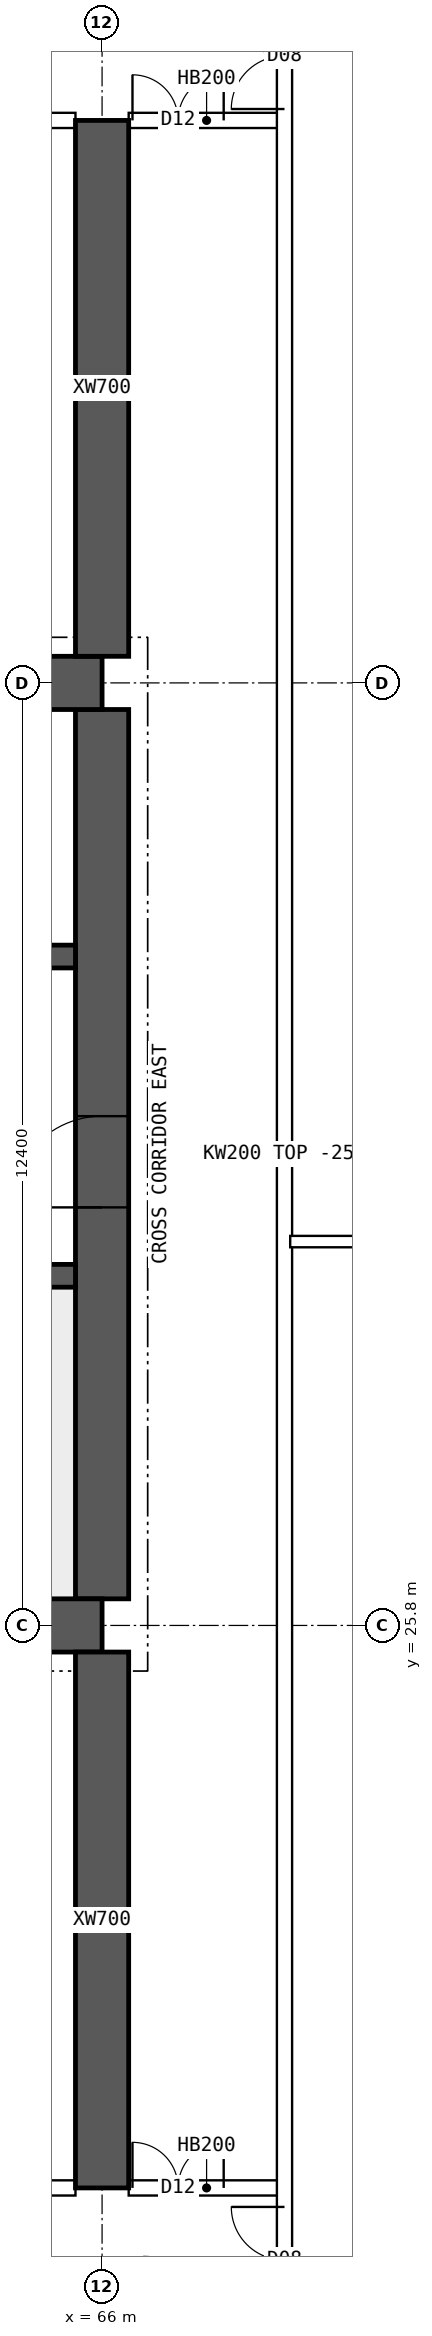
"""IFC4 building model, lengths in metres.
Left out: names, types, materials, properties, quantities, classifications, styles, units other than length and angle.
Written with IfcOpenShell. Run it as: python <this file> out.ifc"""

import sys

from ifc_helpers import new_model, si_unit, direction, frame, frame_2d, origin, place, context, subcontext, project, spatial, polyline, rectangle, outline, extrude, element, fill, save


model = new_model("IFC4")
c1 = context("Model", 3, precision=1e-05, world=origin(), true_north=direction((0.0, 1.0)))
c2 = subcontext(c1, "Body", "Model", "MODEL_VIEW")
j1 = project(units=[si_unit("LENGTHUNIT", "METRE"), si_unit("PLANEANGLEUNIT", "RADIAN")], contexts=[c1])
p1 = place(None, origin())
s1 = spatial("IfcSite", under=j1, at=p1, CompositionType="ELEMENT")
p2 = place(p1, origin())
s2 = spatial("IfcBuilding", under=s1, at=p2, CompositionType="ELEMENT")
p3 = place(p2, frame((0.0, 0.0, 250.3)))
s3 = spatial("IfcBuildingStorey", under=s2, at=p3, CompositionType="ELEMENT", Elevation=250.3)
for number, where, z_axis, x_axis in (
    (1, (18.0, 25.8, 0.0), (0.0, 0.0, 1.0), (1.0, 0.0, 0.0)),
    (2, (18.0, 38.2, 0.0), (0.0, 0.0, 1.0), (1.0, 0.0, 0.0)),
):
    element("IfcWall", number, at=place(p3, frame(where, z_axis=z_axis, x_axis=x_axis)), inside=s3, PredefinedType="SHEAR", context=c2, shape_type="SweptSolid", body=[
        extrude(rectangle(XDim=48.0, YDim=0.7, at=frame_2d((24.0, 0.0))), origin(), (0.0, 0.0, 1.0), 3.75),
    ])
p4 = place(p3, frame((66.0, 26.15, 0.0), z_axis=(0.0, 0.0, 1.0), x_axis=(0.0, 1.0, 0.0)))
e3 = element("IfcWall", 3, at=p4, inside=s3, PredefinedType="SHEAR", context=c2, shape_type="SweptSolid", body=[
    extrude(rectangle(XDim=11.7, YDim=0.7, at=frame_2d((5.85, 0.0))), origin(), (0.0, 0.0, 1.0), 3.75),
])
p5 = place(p4, frame((5.15, 0.0, 0.0)))
e4 = element("IfcOpeningElement", 4, at=p5, cuts=e3, PredefinedType="OPENING", context=c2, shape_type="SweptSolid", body=[
    extrude(rectangle(XDim=1.2, YDim=2.1, at=frame_2d((0.6, 1.05))), frame((0.0, 0.36, 0.0), z_axis=(0.0, -1.0, 0.0), x_axis=(1.0, 0.0, 0.0)), (0.0, 0.0, 1.0), 0.72),
])
p6 = place(p3, frame((18.35, 30.4, 0.0), z_axis=(0.0, 0.0, 1.0), x_axis=(1.0, 0.0, 0.0)))
e5 = element("IfcWall", 5, at=p6, inside=s3, PredefinedType="SHEAR", context=c2, shape_type="SweptSolid", body=[
    extrude(rectangle(XDim=47.3, YDim=0.3, at=frame_2d((23.65, 0.0))), origin(), (0.0, 0.0, 1.0), 3.75),
])
p7 = place(p6, frame((0.4, 0.0, 0.0)))
e6 = element("IfcOpeningElement", 6, at=p7, cuts=e5, PredefinedType="OPENING", context=c2, shape_type="SweptSolid", body=[
    extrude(rectangle(XDim=1.0, YDim=2.1, at=frame_2d((0.5, 1.05))), frame((0.0, 0.16, 0.0), z_axis=(0.0, -1.0, 0.0), x_axis=(1.0, 0.0, 0.0)), (0.0, 0.0, 1.0), 0.32),
])
p8 = place(p6, frame((45.9, 0.0, 0.0)))
e7 = element("IfcOpeningElement", 7, at=p8, cuts=e5, PredefinedType="OPENING", context=c2, shape_type="SweptSolid", body=[
    extrude(rectangle(XDim=1.0, YDim=2.1, at=frame_2d((0.5, 1.05))), frame((0.0, 0.16, 0.0), z_axis=(0.0, -1.0, 0.0), x_axis=(1.0, 0.0, 0.0)), (0.0, 0.0, 1.0), 0.32),
])
p9 = place(p6, frame((8.4, 0.0, 0.0)))
e8 = element("IfcOpeningElement", 8, at=p9, cuts=e5, PredefinedType="OPENING", context=c2, shape_type="SweptSolid", body=[
    extrude(rectangle(XDim=1.1, YDim=2.1, at=frame_2d((0.55, 1.05))), frame((0.0, 0.16, 0.0), z_axis=(0.0, -1.0, 0.0), x_axis=(1.0, 0.0, 0.0)), (0.0, 0.0, 1.0), 0.32),
])
p10 = place(p6, frame((11.0, 0.0, 0.0)))
e9 = element("IfcOpeningElement", 9, at=p10, cuts=e5, PredefinedType="OPENING", context=c2, shape_type="SweptSolid", body=[
    extrude(rectangle(XDim=1.1, YDim=2.1, at=frame_2d((0.55, 1.05))), frame((0.0, 0.16, 0.0), z_axis=(0.0, -1.0, 0.0), x_axis=(1.0, 0.0, 0.0)), (0.0, 0.0, 1.0), 0.32),
])
p11 = place(p6, frame((13.6, 0.0, 0.0)))
e10 = element("IfcOpeningElement", 10, at=p11, cuts=e5, PredefinedType="OPENING", context=c2, shape_type="SweptSolid", body=[
    extrude(rectangle(XDim=1.1, YDim=2.1, at=frame_2d((0.55, 1.05))), frame((0.0, 0.16, 0.0), z_axis=(0.0, -1.0, 0.0), x_axis=(1.0, 0.0, 0.0)), (0.0, 0.0, 1.0), 0.32),
])
p12 = place(p6, frame((16.2, 0.0, 0.0)))
e11 = element("IfcOpeningElement", 11, at=p12, cuts=e5, PredefinedType="OPENING", context=c2, shape_type="SweptSolid", body=[
    extrude(rectangle(XDim=1.1, YDim=2.1, at=frame_2d((0.55, 1.05))), frame((0.0, 0.16, 0.0), z_axis=(0.0, -1.0, 0.0), x_axis=(1.0, 0.0, 0.0)), (0.0, 0.0, 1.0), 0.32),
])
p13 = place(p6, frame((18.975, 0.0, 0.0)))
e12 = element("IfcOpeningElement", 12, at=p13, cuts=e5, PredefinedType="OPENING", context=c2, shape_type="SweptSolid", body=[
    extrude(rectangle(XDim=0.9, YDim=2.1, at=frame_2d((0.45, 1.05))), frame((0.0, 0.16, 0.0), z_axis=(0.0, -1.0, 0.0), x_axis=(1.0, 0.0, 0.0)), (0.0, 0.0, 1.0), 0.32),
])
p14 = place(p6, frame((24.475, 0.0, 0.0)))
e13 = element("IfcOpeningElement", 13, at=p14, cuts=e5, PredefinedType="OPENING", context=c2, shape_type="SweptSolid", body=[
    extrude(rectangle(XDim=0.9, YDim=2.1, at=frame_2d((0.45, 1.05))), frame((0.0, 0.16, 0.0), z_axis=(0.0, -1.0, 0.0), x_axis=(1.0, 0.0, 0.0)), (0.0, 0.0, 1.0), 0.32),
])
p15 = place(p6, frame((30.267, 0.0, 0.0)))
e14 = element("IfcOpeningElement", 14, at=p15, cuts=e5, PredefinedType="OPENING", context=c2, shape_type="SweptSolid", body=[
    extrude(rectangle(XDim=1.1, YDim=2.1, at=frame_2d((0.55, 1.05))), frame((0.0, 0.16, 0.0), z_axis=(0.0, -1.0, 0.0), x_axis=(1.0, 0.0, 0.0)), (0.0, 0.0, 1.0), 0.32),
])
p16 = place(p6, frame((33.8, 0.0, 0.0)))
e15 = element("IfcOpeningElement", 15, at=p16, cuts=e5, PredefinedType="OPENING", context=c2, shape_type="SweptSolid", body=[
    extrude(rectangle(XDim=1.1, YDim=2.1, at=frame_2d((0.55, 1.05))), frame((0.0, 0.16, 0.0), z_axis=(0.0, -1.0, 0.0), x_axis=(1.0, 0.0, 0.0)), (0.0, 0.0, 1.0), 0.32),
])
p17 = place(p6, frame((37.333, 0.0, 0.0)))
e16 = element("IfcOpeningElement", 16, at=p17, cuts=e5, PredefinedType="OPENING", context=c2, shape_type="SweptSolid", body=[
    extrude(rectangle(XDim=1.1, YDim=2.1, at=frame_2d((0.55, 1.05))), frame((0.0, 0.16, 0.0), z_axis=(0.0, -1.0, 0.0), x_axis=(1.0, 0.0, 0.0)), (0.0, 0.0, 1.0), 0.32),
])
p18 = place(p3, frame((18.35, 34.6, 0.0), z_axis=(0.0, 0.0, 1.0), x_axis=(1.0, 0.0, 0.0)))
e17 = element("IfcWall", 17, at=p18, inside=s3, PredefinedType="SHEAR", context=c2, shape_type="SweptSolid", body=[
    extrude(rectangle(XDim=47.3, YDim=0.3, at=frame_2d((23.65, 0.0))), origin(), (0.0, 0.0, 1.0), 3.75),
])
p19 = place(p18, frame((0.9, 0.0, 0.0)))
e18 = element("IfcOpeningElement", 18, at=p19, cuts=e17, PredefinedType="OPENING", context=c2, shape_type="SweptSolid", body=[
    extrude(rectangle(XDim=1.1, YDim=2.1, at=frame_2d((0.55, 1.05))), frame((0.0, 0.16, 0.0), z_axis=(0.0, -1.0, 0.0), x_axis=(1.0, 0.0, 0.0)), (0.0, 0.0, 1.0), 0.32),
])
p20 = place(p18, frame((45.3, 0.0, 0.0)))
e19 = element("IfcOpeningElement", 19, at=p20, cuts=e17, PredefinedType="OPENING", context=c2, shape_type="SweptSolid", body=[
    extrude(rectangle(XDim=1.1, YDim=2.1, at=frame_2d((0.55, 1.05))), frame((0.0, 0.16, 0.0), z_axis=(0.0, -1.0, 0.0), x_axis=(1.0, 0.0, 0.0)), (0.0, 0.0, 1.0), 0.32),
])
p21 = place(p18, frame((4.25, 0.0, 0.0)))
e20 = element("IfcOpeningElement", 20, at=p21, cuts=e17, PredefinedType="OPENING", context=c2, shape_type="SweptSolid", body=[
    extrude(rectangle(XDim=0.9, YDim=2.1, at=frame_2d((0.45, 1.05))), frame((0.0, 0.16, 0.0), z_axis=(0.0, -1.0, 0.0), x_axis=(1.0, 0.0, 0.0)), (0.0, 0.0, 1.0), 0.32),
])
p22 = place(p18, frame((42.15, 0.0, 0.0)))
e21 = element("IfcOpeningElement", 21, at=p22, cuts=e17, PredefinedType="OPENING", context=c2, shape_type="SweptSolid", body=[
    extrude(rectangle(XDim=0.9, YDim=2.1, at=frame_2d((0.45, 1.05))), frame((0.0, 0.16, 0.0), z_axis=(0.0, -1.0, 0.0), x_axis=(1.0, 0.0, 0.0)), (0.0, 0.0, 1.0), 0.32),
])
p23 = place(p18, frame((9.025, 0.0, 0.0)))
e22 = element("IfcOpeningElement", 22, at=p23, cuts=e17, PredefinedType="OPENING", context=c2, shape_type="SweptSolid", body=[
    extrude(rectangle(XDim=0.9, YDim=2.1, at=frame_2d((0.45, 1.05))), frame((0.0, 0.16, 0.0), z_axis=(0.0, -1.0, 0.0), x_axis=(1.0, 0.0, 0.0)), (0.0, 0.0, 1.0), 0.32),
])
p24 = place(p18, frame((12.999, 0.0, 0.0)))
e23 = element("IfcOpeningElement", 23, at=p24, cuts=e17, PredefinedType="OPENING", context=c2, shape_type="SweptSolid", body=[
    extrude(rectangle(XDim=0.9, YDim=2.1, at=frame_2d((0.45, 1.05))), frame((0.0, 0.16, 0.0), z_axis=(0.0, -1.0, 0.0), x_axis=(1.0, 0.0, 0.0)), (0.0, 0.0, 1.0), 0.32),
])
p25 = place(p18, frame((16.646, 0.0, 0.0)))
e24 = element("IfcOpeningElement", 24, at=p25, cuts=e17, PredefinedType="OPENING", context=c2, shape_type="SweptSolid", body=[
    extrude(rectangle(XDim=0.9, YDim=2.1, at=frame_2d((0.45, 1.05))), frame((0.0, 0.16, 0.0), z_axis=(0.0, -1.0, 0.0), x_axis=(1.0, 0.0, 0.0)), (0.0, 0.0, 1.0), 0.32),
])
p26 = place(p18, frame((20.405, 0.0, 0.0)))
e25 = element("IfcOpeningElement", 25, at=p26, cuts=e17, PredefinedType="OPENING", context=c2, shape_type="SweptSolid", body=[
    extrude(rectangle(XDim=0.9, YDim=2.1, at=frame_2d((0.45, 1.05))), frame((0.0, 0.16, 0.0), z_axis=(0.0, -1.0, 0.0), x_axis=(1.0, 0.0, 0.0)), (0.0, 0.0, 1.0), 0.32),
])
p27 = place(p18, frame((24.811, 0.0, 0.0)))
e26 = element("IfcOpeningElement", 26, at=p27, cuts=e17, PredefinedType="OPENING", context=c2, shape_type="SweptSolid", body=[
    extrude(rectangle(XDim=0.9, YDim=2.1, at=frame_2d((0.45, 1.05))), frame((0.0, 0.16, 0.0), z_axis=(0.0, -1.0, 0.0), x_axis=(1.0, 0.0, 0.0)), (0.0, 0.0, 1.0), 0.32),
])
p28 = place(p18, frame((27.608, 0.0, 0.0)))
e27 = element("IfcOpeningElement", 27, at=p28, cuts=e17, PredefinedType="OPENING", context=c2, shape_type="SweptSolid", body=[
    extrude(rectangle(XDim=0.9, YDim=2.1, at=frame_2d((0.45, 1.05))), frame((0.0, 0.16, 0.0), z_axis=(0.0, -1.0, 0.0), x_axis=(1.0, 0.0, 0.0)), (0.0, 0.0, 1.0), 0.32),
])
p29 = place(p18, frame((29.981, 0.0, 0.0)))
e28 = element("IfcOpeningElement", 28, at=p29, cuts=e17, PredefinedType="OPENING", context=c2, shape_type="SweptSolid", body=[
    extrude(rectangle(XDim=0.9, YDim=2.1, at=frame_2d((0.45, 1.05))), frame((0.0, 0.16, 0.0), z_axis=(0.0, -1.0, 0.0), x_axis=(1.0, 0.0, 0.0)), (0.0, 0.0, 1.0), 0.32),
])
p30 = place(p18, frame((35.451, 0.0, 0.0)))
e29 = element("IfcOpeningElement", 29, at=p30, cuts=e17, PredefinedType="OPENING", context=c2, shape_type="SweptSolid", body=[
    extrude(rectangle(XDim=0.9, YDim=2.1, at=frame_2d((0.45, 1.05))), frame((0.0, 0.16, 0.0), z_axis=(0.0, -1.0, 0.0), x_axis=(1.0, 0.0, 0.0)), (0.0, 0.0, 1.0), 0.32),
])
for number, where, z_axis, x_axis in (
    (30, (66.0, 18.4, 0.0), (0.0, 0.0, 1.0), (0.0, 1.0, 0.0)),
    (31, (66.0, 38.55, 0.0), (0.0, 0.0, 1.0), (0.0, 1.0, 0.0)),
):
    element("IfcWall", number, at=place(p3, frame(where, z_axis=z_axis, x_axis=x_axis)), inside=s3, PredefinedType="SHEAR", context=c2, shape_type="SweptSolid", body=[
        extrude(rectangle(XDim=7.05, YDim=0.7, at=frame_2d((3.525, 0.0))), origin(), (0.0, 0.0, 1.0), 3.75),
    ])
p31 = place(p3, frame((60.35, 18.4, 0.0), z_axis=(0.0, 0.0, 1.0), x_axis=(1.0, 0.0, 0.0)))
e32 = element("IfcWall", 32, at=p31, inside=s3, PredefinedType="SOLIDWALL", context=c2, shape_type="SweptSolid", body=[
    extrude(rectangle(XDim=5.3, YDim=0.2, at=frame_2d((2.65, 0.0))), origin(), (0.0, 0.0, 1.0), 3.5),
])
p32 = place(p31, frame((0.525, 0.0, 0.0)))
e33 = element("IfcOpeningElement", 33, at=p32, cuts=e32, PredefinedType="OPENING", context=c2, shape_type="SweptSolid", body=[
    extrude(rectangle(XDim=1.0, YDim=2.1, at=frame_2d((0.5, 1.05))), frame((0.0, 0.11, 0.0), z_axis=(0.0, -1.0, 0.0), x_axis=(1.0, 0.0, 0.0)), (0.0, 0.0, 1.0), 0.22),
])
p33 = place(p3, frame((66.35, 18.4, 0.0), z_axis=(0.0, 0.0, 1.0), x_axis=(1.0, 0.0, 0.0)))
e34 = element("IfcWall", 34, at=p33, inside=s3, PredefinedType="SOLIDWALL", context=c2, shape_type="SweptSolid", body=[
    extrude(rectangle(XDim=2.05, YDim=0.2, at=frame_2d((1.025, 0.0))), origin(), (0.0, 0.0, 1.0), 3.5),
])
p34 = place(p33, frame((0.05, 0.0, 0.0)))
e35 = element("IfcOpeningElement", 35, at=p34, cuts=e34, PredefinedType="OPENING", context=c2, shape_type="SweptSolid", body=[
    extrude(rectangle(XDim=1.2, YDim=2.1, at=frame_2d((0.6, 1.05))), frame((0.0, 0.11, 0.0), z_axis=(0.0, -1.0, 0.0), x_axis=(1.0, 0.0, 0.0)), (0.0, 0.0, 1.0), 0.22),
])
p35 = place(p3, frame((60.35, 45.6, 0.0), z_axis=(0.0, 0.0, 1.0), x_axis=(1.0, 0.0, 0.0)))
e36 = element("IfcWall", 36, at=p35, inside=s3, PredefinedType="SOLIDWALL", context=c2, shape_type="SweptSolid", body=[
    extrude(rectangle(XDim=5.3, YDim=0.2, at=frame_2d((2.65, 0.0))), origin(), (0.0, 0.0, 1.0), 3.5),
])
p36 = place(p35, frame((0.525, 0.0, 0.0)))
e37 = element("IfcOpeningElement", 37, at=p36, cuts=e36, PredefinedType="OPENING", context=c2, shape_type="SweptSolid", body=[
    extrude(rectangle(XDim=1.0, YDim=2.1, at=frame_2d((0.5, 1.05))), frame((0.0, 0.11, 0.0), z_axis=(0.0, -1.0, 0.0), x_axis=(1.0, 0.0, 0.0)), (0.0, 0.0, 1.0), 0.22),
])
p37 = place(p3, frame((66.35, 45.6, 0.0), z_axis=(0.0, 0.0, 1.0), x_axis=(1.0, 0.0, 0.0)))
e38 = element("IfcWall", 38, at=p37, inside=s3, PredefinedType="SOLIDWALL", context=c2, shape_type="SweptSolid", body=[
    extrude(rectangle(XDim=2.05, YDim=0.2, at=frame_2d((1.025, 0.0))), origin(), (0.0, 0.0, 1.0), 3.5),
])
p38 = place(p37, frame((0.05, 0.0, 0.0)))
e39 = element("IfcOpeningElement", 39, at=p38, cuts=e38, PredefinedType="OPENING", context=c2, shape_type="SweptSolid", body=[
    extrude(rectangle(XDim=1.2, YDim=2.1, at=frame_2d((0.6, 1.05))), frame((0.0, 0.11, 0.0), z_axis=(0.0, -1.0, 0.0), x_axis=(1.0, 0.0, 0.0)), (0.0, 0.0, 1.0), 0.22),
])
p39 = place(p3, frame((68.475, 30.85, 0.0), z_axis=(0.0, 0.0, 1.0), x_axis=(1.0, 0.0, 0.0)))
e40 = element("IfcWall", 40, at=p39, inside=s3, PredefinedType="PARTITIONING", context=c2, shape_type="SweptSolid", body=[
    extrude(outline(polyline([(0.0, 0.0), (6.82, 0.0), (6.82, 3.5), (3.827, 3.5), (3.825, 3.05), (3.227, 3.05), (3.225, 3.5), (0.0, 3.5), (0.0, 0.0)])), frame((0.0, 0.075, 0.0), z_axis=(0.0, -1.0, 0.0), x_axis=(1.0, 0.0, 0.0)), (0.0, 0.0, 1.0), 0.15),
])
p40 = place(p3, frame((68.4, 11.646, 0.0), z_axis=(0.0, 0.0, 1.0), x_axis=(0.0, 1.0, 0.0)))
e41 = element("IfcWall", 41, at=p40, inside=s3, PredefinedType="SOLIDWALL", context=c2, shape_type="SweptSolid", body=[
    extrude(rectangle(XDim=40.708, YDim=0.2, at=frame_2d((20.354, 0.0))), origin(), (0.0, 0.0, 1.0), 3.5),
])
p41 = place(p40, frame((5.104, 0.0, 0.0)))
e42 = element("IfcOpeningElement", 42, at=p41, cuts=e41, PredefinedType="OPENING", context=c2, shape_type="SweptSolid", body=[
    extrude(rectangle(XDim=1.4, YDim=2.1, at=frame_2d((0.7, 1.05))), frame((0.0, 0.11, 0.0), z_axis=(0.0, -1.0, 0.0), x_axis=(1.0, 0.0, 0.0)), (0.0, 0.0, 1.0), 0.22),
])
p42 = place(p40, frame((34.104, 0.0, 0.0)))
e43 = element("IfcOpeningElement", 43, at=p42, cuts=e41, PredefinedType="OPENING", context=c2, shape_type="SweptSolid", body=[
    extrude(rectangle(XDim=1.4, YDim=2.1, at=frame_2d((0.7, 1.05))), frame((0.0, 0.11, 0.0), z_axis=(0.0, -1.0, 0.0), x_axis=(1.0, 0.0, 0.0)), (0.0, 0.0, 1.0), 0.22),
])
p43 = place(p5, origin())
e44 = element("IfcDoor", 44, at=p43, inside=s3, OperationType="SINGLE_SWING_LEFT", PredefinedType="DOOR", context=c2, shape_type="SweptSolid", body=[
    extrude(rectangle(XDim=1.2, YDim=2.1, at=frame_2d((0.6, 1.05))), frame((0.0, 0.025, 0.0), z_axis=(0.0, -1.0, 0.0), x_axis=(1.0, 0.0, 0.0)), (0.0, 0.0, 1.0), 0.05),
])
fill(e4, e44)
p44 = place(p34, origin())
e45 = element("IfcDoor", 45, at=p44, inside=s3, OperationType="DOUBLE_DOOR_SINGLE_SWING", PredefinedType="DOOR", context=c2, shape_type="SweptSolid", body=[
    extrude(rectangle(XDim=1.2, YDim=2.1, at=frame_2d((0.6, 1.05))), frame((0.0, 0.025, 0.0), z_axis=(0.0, -1.0, 0.0), x_axis=(1.0, 0.0, 0.0)), (0.0, 0.0, 1.0), 0.05),
])
fill(e35, e45)
p45 = place(p38, origin())
e46 = element("IfcDoor", 46, at=p45, inside=s3, OperationType="DOUBLE_DOOR_SINGLE_SWING", PredefinedType="DOOR", context=c2, shape_type="SweptSolid", body=[
    extrude(rectangle(XDim=1.2, YDim=2.1, at=frame_2d((0.6, 1.05))), frame((0.0, 0.025, 0.0), z_axis=(0.0, -1.0, 0.0), x_axis=(1.0, 0.0, 0.0)), (0.0, 0.0, 1.0), 0.05),
])
fill(e39, e46)
p46 = place(p41, origin())
e47 = element("IfcDoor", 47, at=p46, inside=s3, OperationType="DOUBLE_DOOR_SINGLE_SWING", PredefinedType="DOOR", context=c2, shape_type="SweptSolid", body=[
    extrude(rectangle(XDim=1.4, YDim=2.1, at=frame_2d((0.7, 1.05))), frame((0.0, 0.025, 0.0), z_axis=(0.0, -1.0, 0.0), x_axis=(1.0, 0.0, 0.0)), (0.0, 0.0, 1.0), 0.05),
])
fill(e42, e47)
p47 = place(p42, origin())
e48 = element("IfcDoor", 48, at=p47, inside=s3, OperationType="DOUBLE_DOOR_SINGLE_SWING", PredefinedType="DOOR", context=c2, shape_type="SweptSolid", body=[
    extrude(rectangle(XDim=1.4, YDim=2.1, at=frame_2d((0.7, 1.05))), frame((0.0, 0.025, 0.0), z_axis=(0.0, -1.0, 0.0), x_axis=(1.0, 0.0, 0.0)), (0.0, 0.0, 1.0), 0.05),
])
fill(e43, e48)
save(model, sys.argv[1])
